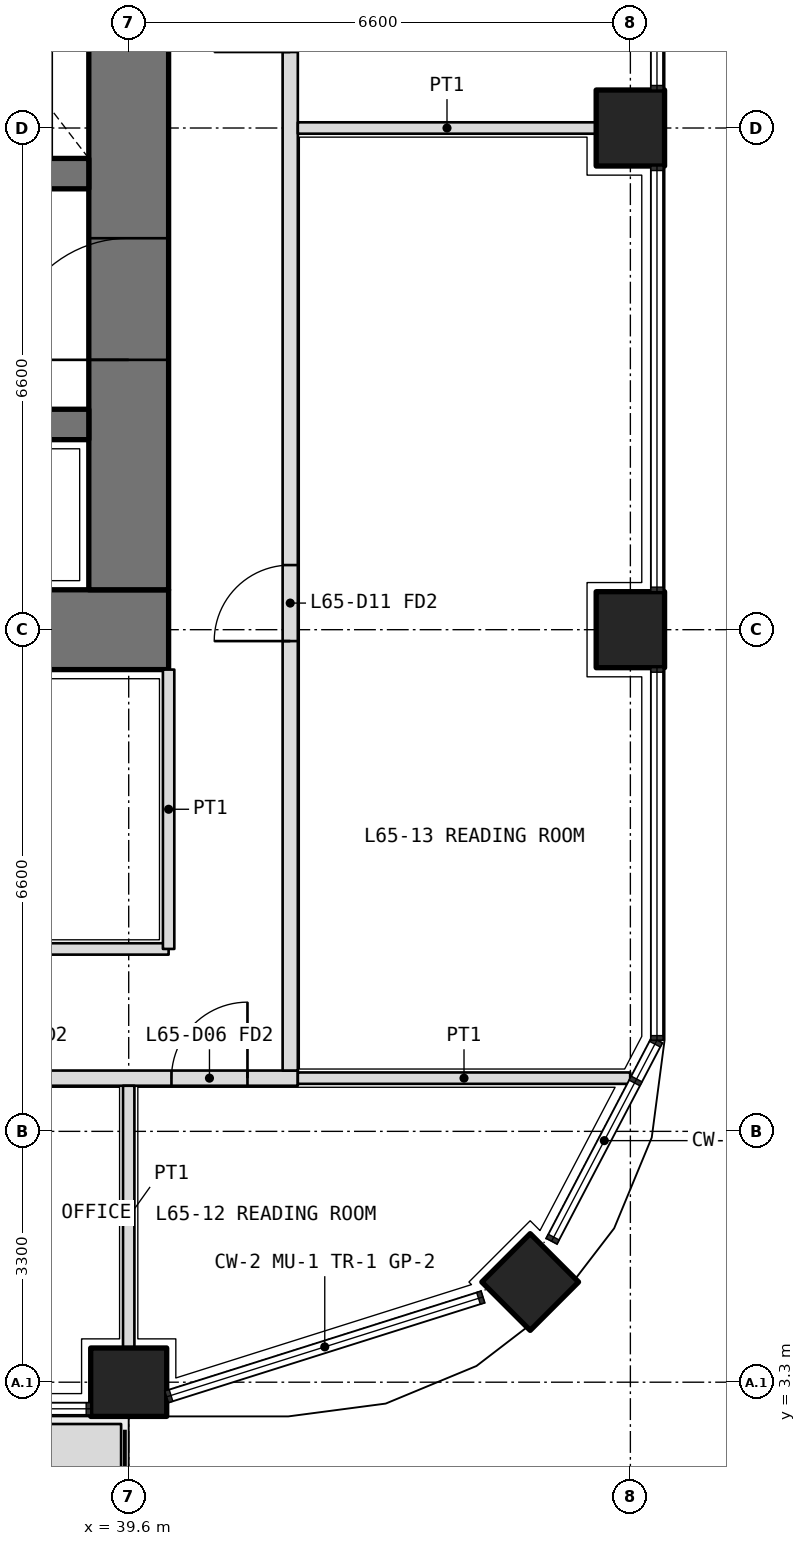
"""IFC4 building model, lengths in metres.
Left out: names, types, materials, properties, quantities, classifications, styles, units other than length and angle.
Written with IfcOpenShell. Run it as: python <this file> out.ifc"""

import sys

from ifc_helpers import new_model, si_unit, direction, frame, frame_2d, origin, origin_2d, place, context, subcontext, project, spatial, polyline, rectangle, outline, extrude, element, fill, save


model = new_model("IFC4")
c1 = context("Model", 3, precision=1e-05, world=origin(), true_north=direction((0.0, 1.0)))
c2 = subcontext(c1, "Body", "Model", "MODEL_VIEW")
j1 = project(units=[si_unit("LENGTHUNIT", "METRE"), si_unit("PLANEANGLEUNIT", "RADIAN")], contexts=[c1])
p1 = place(None, origin())
s1 = spatial("IfcSite", under=j1, at=p1, CompositionType="ELEMENT")
p2 = place(p1, origin())
s2 = spatial("IfcBuilding", under=s1, at=p2, CompositionType="ELEMENT")
p3 = place(p2, frame((0.0, 0.0, 283.8)))
s3 = spatial("IfcBuildingStorey", under=s2, at=p3, CompositionType="ELEMENT", Elevation=283.8)
p4 = place(p3, frame((44.882, 4.618, 0.0), z_axis=(0.0, 0.0, 1.0), x_axis=(0.707106781187, 0.707106781187, 0.0)))
e1 = element("IfcColumn", 1, at=p4, inside=s3, PredefinedType="COLUMN", context=c2, shape_type="SweptSolid", body=[
    extrude(rectangle(XDim=0.9, YDim=0.9, at=origin_2d()), origin(), (0.0, 0.0, 1.0), 4.2),
])
for number, where, z_axis, x_axis in (
    (2, (39.6, 3.3, 0.0), (0.0, 0.0, 1.0), (1.0, 0.0, 0.0)),
    (3, (46.2, 13.2, 0.0), (0.0, 0.0, 1.0), (0.0, 1.0, 0.0)),
    (4, (46.2, 19.8, 0.0), (0.0, 0.0, 1.0), (0.0, 1.0, 0.0)),
):
    element("IfcColumn", number, at=place(p3, frame(where, z_axis=z_axis, x_axis=x_axis)), inside=s3, PredefinedType="COLUMN", context=c2, shape_type="SweptSolid", body=[
        extrude(rectangle(XDim=1.0, YDim=0.9, at=origin_2d()), origin(), (0.0, 0.0, 1.0), 4.2),
    ])
p5 = place(p3, origin())
e5 = element("IfcWall", 5, at=p5, inside=s3, PredefinedType="USERDEFINED", context=c2, shape_type="SweptSolid", body=[
    extrude(outline(polyline([(30.45, 1.75), (39.5, 1.75), (39.5, 2.75), (30.45, 2.75), (30.45, 1.75)]), holes=[polyline([(30.6, 1.9), (39.35, 1.9), (39.35, 2.6), (30.6, 2.6), (30.6, 1.9)])]), origin(), (0.0, 0.0, 1.0), 1.05),
])
p6 = place(p3, frame((12.675, 13.2, 0.0), z_axis=(0.0, 0.0, 1.0), x_axis=(1.0, 0.0, 0.0)))
e6 = element("IfcWall", 6, at=p6, inside=s3, PredefinedType="SHEAR", context=c2, shape_type="SweptSolid", body=[
    extrude(rectangle(XDim=27.45, YDim=1.05, at=frame_2d((13.725, 0.0))), origin(), (0.0, 0.0, 1.0), 4.2),
])
p7 = place(p3, frame((39.6, 13.725, 0.0), z_axis=(0.0, 0.0, 1.0), x_axis=(0.0, 1.0, 0.0)))
e7 = element("IfcWall", 7, at=p7, inside=s3, PredefinedType="SHEAR", context=c2, shape_type="SweptSolid", body=[
    extrude(rectangle(XDim=18.75, YDim=1.05, at=frame_2d((9.375, 0.0))), origin(), (0.0, 0.0, 1.0), 4.2),
])
p8 = place(p7, frame((3.025, 0.0, 0.0)))
e8 = element("IfcOpeningElement", 8, at=p8, cuts=e7, PredefinedType="OPENING", context=c2, shape_type="SweptSolid", body=[
    extrude(rectangle(XDim=1.6, YDim=2.1, at=frame_2d((0.8, 1.05))), frame((0.0, 0.535, 0.0), z_axis=(0.0, -1.0, 0.0), x_axis=(1.0, 0.0, 0.0)), (0.0, 0.0, 1.0), 1.07),
])
p9 = place(p7, frame((13.825, 0.0, 0.0)))
e9 = element("IfcOpeningElement", 9, at=p9, cuts=e7, PredefinedType="OPENING", context=c2, shape_type="SweptSolid", body=[
    extrude(rectangle(XDim=1.6, YDim=2.1, at=frame_2d((0.8, 1.05))), frame((0.0, 0.535, 0.0), z_axis=(0.0, -1.0, 0.0), x_axis=(1.0, 0.0, 0.0)), (0.0, 0.0, 1.0), 1.07),
])
p10 = place(p3, frame((13.725, 15.9, 0.0), z_axis=(0.0, 0.0, 1.0), x_axis=(1.0, 0.0, 0.0)))
e10 = element("IfcWall", 10, at=p10, inside=s3, PredefinedType="SHEAR", context=c2, shape_type="SweptSolid", body=[
    extrude(rectangle(XDim=25.35, YDim=0.4, at=frame_2d((12.675, 0.0))), origin(), (0.0, 0.0, 1.0), 4.2),
])
p11 = place(p10, frame((0.837, 0.0, 0.0)))
e11 = element("IfcOpeningElement", 11, at=p11, cuts=e10, PredefinedType="OPENING", context=c2, shape_type="SweptSolid", body=[
    extrude(rectangle(XDim=1.0, YDim=2.1, at=frame_2d((0.5, 1.05))), frame((0.0, 0.21, 0.0), z_axis=(0.0, -1.0, 0.0), x_axis=(1.0, 0.0, 0.0)), (0.0, 0.0, 1.0), 0.42),
])
p12 = place(p10, frame((3.925, 0.0, 0.0)))
e12 = element("IfcOpeningElement", 12, at=p12, cuts=e10, PredefinedType="OPENING", context=c2, shape_type="SweptSolid", body=[
    extrude(rectangle(XDim=1.0, YDim=2.1, at=frame_2d((0.5, 1.05))), frame((0.0, 0.21, 0.0), z_axis=(0.0, -1.0, 0.0), x_axis=(1.0, 0.0, 0.0)), (0.0, 0.0, 1.0), 0.42),
])
p13 = place(p10, frame((7.225, 0.0, 0.0)))
e13 = element("IfcOpeningElement", 13, at=p13, cuts=e10, PredefinedType="OPENING", context=c2, shape_type="SweptSolid", body=[
    extrude(rectangle(XDim=1.0, YDim=2.1, at=frame_2d((0.5, 1.05))), frame((0.0, 0.21, 0.0), z_axis=(0.0, -1.0, 0.0), x_axis=(1.0, 0.0, 0.0)), (0.0, 0.0, 1.0), 0.42),
])
p14 = place(p10, frame((10.525, 0.0, 0.0)))
e14 = element("IfcOpeningElement", 14, at=p14, cuts=e10, PredefinedType="OPENING", context=c2, shape_type="SweptSolid", body=[
    extrude(rectangle(XDim=1.0, YDim=2.1, at=frame_2d((0.5, 1.05))), frame((0.0, 0.21, 0.0), z_axis=(0.0, -1.0, 0.0), x_axis=(1.0, 0.0, 0.0)), (0.0, 0.0, 1.0), 0.42),
])
p15 = place(p10, frame((13.825, 0.0, 0.0)))
e15 = element("IfcOpeningElement", 15, at=p15, cuts=e10, PredefinedType="OPENING", context=c2, shape_type="SweptSolid", body=[
    extrude(rectangle(XDim=1.0, YDim=2.1, at=frame_2d((0.5, 1.05))), frame((0.0, 0.21, 0.0), z_axis=(0.0, -1.0, 0.0), x_axis=(1.0, 0.0, 0.0)), (0.0, 0.0, 1.0), 0.42),
])
p16 = place(p10, frame((17.125, 0.0, 0.0)))
e16 = element("IfcOpeningElement", 16, at=p16, cuts=e10, PredefinedType="OPENING", context=c2, shape_type="SweptSolid", body=[
    extrude(rectangle(XDim=1.0, YDim=2.1, at=frame_2d((0.5, 1.05))), frame((0.0, 0.21, 0.0), z_axis=(0.0, -1.0, 0.0), x_axis=(1.0, 0.0, 0.0)), (0.0, 0.0, 1.0), 0.42),
])
p17 = place(p10, frame((20.425, 0.0, 0.0)))
e17 = element("IfcOpeningElement", 17, at=p17, cuts=e10, PredefinedType="OPENING", context=c2, shape_type="SweptSolid", body=[
    extrude(rectangle(XDim=1.0, YDim=2.1, at=frame_2d((0.5, 1.05))), frame((0.0, 0.21, 0.0), z_axis=(0.0, -1.0, 0.0), x_axis=(1.0, 0.0, 0.0)), (0.0, 0.0, 1.0), 0.42),
])
p18 = place(p10, frame((23.512, 0.0, 0.0)))
e18 = element("IfcOpeningElement", 18, at=p18, cuts=e10, PredefinedType="OPENING", context=c2, shape_type="SweptSolid", body=[
    extrude(rectangle(XDim=1.0, YDim=2.1, at=frame_2d((0.5, 1.05))), frame((0.0, 0.21, 0.0), z_axis=(0.0, -1.0, 0.0), x_axis=(1.0, 0.0, 0.0)), (0.0, 0.0, 1.0), 0.42),
])
p19 = place(p3, frame((13.725, 19.2, 0.0), z_axis=(0.0, 0.0, 1.0), x_axis=(1.0, 0.0, 0.0)))
e19 = element("IfcWall", 19, at=p19, inside=s3, PredefinedType="SHEAR", context=c2, shape_type="SweptSolid", body=[
    extrude(rectangle(XDim=25.35, YDim=0.4, at=frame_2d((12.675, 0.0))), origin(), (0.0, 0.0, 1.0), 4.2),
])
p20 = place(p19, frame((10.575, 0.0, 0.0)))
e20 = element("IfcOpeningElement", 20, at=p20, cuts=e19, PredefinedType="OPENING", context=c2, shape_type="SweptSolid", body=[
    extrude(rectangle(XDim=0.9, YDim=2.1, at=frame_2d((0.45, 1.05))), frame((0.0, 0.21, 0.0), z_axis=(0.0, -1.0, 0.0), x_axis=(1.0, 0.0, 0.0)), (0.0, 0.0, 1.0), 0.42),
])
p21 = place(p19, frame((13.875, 0.0, 0.0)))
e21 = element("IfcOpeningElement", 21, at=p21, cuts=e19, PredefinedType="OPENING", context=c2, shape_type="SweptSolid", body=[
    extrude(rectangle(XDim=0.9, YDim=2.1, at=frame_2d((0.45, 1.05))), frame((0.0, 0.21, 0.0), z_axis=(0.0, -1.0, 0.0), x_axis=(1.0, 0.0, 0.0)), (0.0, 0.0, 1.0), 0.42),
])
p22 = place(p19, frame((0.2, 0.0, 0.0)))
e22 = element("IfcOpeningElement", 22, at=p22, cuts=e19, PredefinedType="OPENING", context=c2, shape_type="SweptSolid", body=[
    extrude(rectangle(XDim=1.2, YDim=2.1, at=frame_2d((0.6, 1.05))), frame((0.0, 0.21, 0.0), z_axis=(0.0, -1.0, 0.0), x_axis=(1.0, 0.0, 0.0)), (0.0, 0.0, 1.0), 0.42),
])
p23 = place(p19, frame((23.512, 0.0, 0.0)))
e23 = element("IfcOpeningElement", 23, at=p23, cuts=e19, PredefinedType="OPENING", context=c2, shape_type="SweptSolid", body=[
    extrude(rectangle(XDim=1.1, YDim=2.1, at=frame_2d((0.55, 1.05))), frame((0.0, 0.21, 0.0), z_axis=(0.0, -1.0, 0.0), x_axis=(1.0, 0.0, 0.0)), (0.0, 0.0, 1.0), 0.42),
])
p24 = place(p19, frame((17.125, 0.0, 0.0)))
e24 = element("IfcOpeningElement", 24, at=p24, cuts=e19, PredefinedType="OPENING", context=c2, shape_type="SweptSolid", body=[
    extrude(rectangle(XDim=1.1, YDim=2.1, at=frame_2d((0.55, 1.05))), frame((0.0, 0.21, 0.0), z_axis=(0.0, -1.0, 0.0), x_axis=(1.0, 0.0, 0.0)), (0.0, 0.0, 1.0), 0.42),
])
p25 = place(p19, frame((20.325, 0.0, 0.0)))
e25 = element("IfcOpeningElement", 25, at=p25, cuts=e19, PredefinedType="OPENING", context=c2, shape_type="SweptSolid", body=[
    extrude(rectangle(XDim=1.1, YDim=2.1, at=frame_2d((0.55, 1.05))), frame((0.0, 0.21, 0.0), z_axis=(0.0, -1.0, 0.0), x_axis=(1.0, 0.0, 0.0)), (0.0, 0.0, 1.0), 0.42),
])
p26 = place(p3, frame((12.675, 9.0, 0.0), z_axis=(0.0, 0.0, 1.0), x_axis=(1.0, 0.0, 0.0)))
e26 = element("IfcWall", 26, at=p26, inside=s3, PredefinedType="PARTITIONING", context=c2, shape_type="SweptSolid", body=[
    extrude(rectangle(XDim=27.45, YDim=0.15, at=frame_2d((13.725, 0.0))), origin(), (0.0, 0.0, 1.0), 3.0),
])
p27 = place(p26, frame((3.062, 0.0, 0.0)))
e27 = element("IfcOpeningElement", 27, at=p27, cuts=e26, PredefinedType="OPENING", context=c2, shape_type="SweptSolid", body=[
    extrude(rectangle(XDim=1.0, YDim=2.1, at=frame_2d((0.5, 1.05))), frame((0.0, 0.085, 0.0), z_axis=(0.0, -1.0, 0.0), x_axis=(1.0, 0.0, 0.0)), (0.0, 0.0, 1.0), 0.17),
])
p28 = place(p26, frame((13.225, 0.0, 0.0)))
e28 = element("IfcOpeningElement", 28, at=p28, cuts=e26, PredefinedType="OPENING", context=c2, shape_type="SweptSolid", body=[
    extrude(rectangle(XDim=1.0, YDim=2.1, at=frame_2d((0.5, 1.05))), frame((0.0, 0.085, 0.0), z_axis=(0.0, -1.0, 0.0), x_axis=(1.0, 0.0, 0.0)), (0.0, 0.0, 1.0), 0.17),
])
p29 = place(p26, frame((23.387, 0.0, 0.0)))
e29 = element("IfcOpeningElement", 29, at=p29, cuts=e26, PredefinedType="OPENING", context=c2, shape_type="SweptSolid", body=[
    extrude(rectangle(XDim=1.0, YDim=2.1, at=frame_2d((0.5, 1.05))), frame((0.0, 0.085, 0.0), z_axis=(0.0, -1.0, 0.0), x_axis=(1.0, 0.0, 0.0)), (0.0, 0.0, 1.0), 0.17),
])
p30 = place(p3, frame((40.125, 12.675, 0.0), z_axis=(0.0, 0.0, 1.0), x_axis=(0.0, -1.0, 0.0)))
e30 = element("IfcWall", 30, at=p30, inside=s3, PredefinedType="PARTITIONING", context=c2, shape_type="SweptSolid", body=[
    extrude(rectangle(XDim=3.675, YDim=0.15, at=frame_2d((1.837, 0.0))), origin(), (0.0, 0.0, 1.0), 3.0),
])
p31 = place(p3, frame((10.975, 7.3, 0.0), z_axis=(0.0, 0.0, 1.0), x_axis=(1.0, 0.0, 0.0)))
e31 = element("IfcWall", 31, at=p31, inside=s3, PredefinedType="PARTITIONING", context=c2, shape_type="SweptSolid", body=[
    extrude(rectangle(XDim=30.85, YDim=0.2, at=frame_2d((15.425, 0.0))), origin(), (0.0, 0.0, 1.0), 3.0),
])
p32 = place(p31, frame((2.312, 0.0, 0.0)))
e32 = element("IfcOpeningElement", 32, at=p32, cuts=e31, PredefinedType="OPENING", context=c2, shape_type="SweptSolid", body=[
    extrude(rectangle(XDim=1.0, YDim=2.1, at=frame_2d((0.5, 1.05))), frame((0.0, 0.11, 0.0), z_axis=(0.0, -1.0, 0.0), x_axis=(1.0, 0.0, 0.0)), (0.0, 0.0, 1.0), 0.22),
])
p33 = place(p31, frame((9.975, 0.0, 0.0)))
e33 = element("IfcOpeningElement", 33, at=p33, cuts=e31, PredefinedType="OPENING", context=c2, shape_type="SweptSolid", body=[
    extrude(rectangle(XDim=1.0, YDim=2.1, at=frame_2d((0.5, 1.05))), frame((0.0, 0.11, 0.0), z_axis=(0.0, -1.0, 0.0), x_axis=(1.0, 0.0, 0.0)), (0.0, 0.0, 1.0), 0.22),
])
p34 = place(p31, frame((19.875, 0.0, 0.0)))
e34 = element("IfcOpeningElement", 34, at=p34, cuts=e31, PredefinedType="OPENING", context=c2, shape_type="SweptSolid", body=[
    extrude(rectangle(XDim=1.0, YDim=2.1, at=frame_2d((0.5, 1.05))), frame((0.0, 0.11, 0.0), z_axis=(0.0, -1.0, 0.0), x_axis=(1.0, 0.0, 0.0)), (0.0, 0.0, 1.0), 0.22),
])
p35 = place(p31, frame((26.475, 0.0, 0.0)))
e35 = element("IfcOpeningElement", 35, at=p35, cuts=e31, PredefinedType="OPENING", context=c2, shape_type="SweptSolid", body=[
    extrude(rectangle(XDim=1.0, YDim=2.1, at=frame_2d((0.5, 1.05))), frame((0.0, 0.11, 0.0), z_axis=(0.0, -1.0, 0.0), x_axis=(1.0, 0.0, 0.0)), (0.0, 0.0, 1.0), 0.22),
])
p36 = place(p31, frame((29.188, 0.0, 0.0)))
e36 = element("IfcOpeningElement", 36, at=p36, cuts=e31, PredefinedType="OPENING", context=c2, shape_type="SweptSolid", body=[
    extrude(rectangle(XDim=1.0, YDim=2.1, at=frame_2d((0.5, 1.05))), frame((0.0, 0.11, 0.0), z_axis=(0.0, -1.0, 0.0), x_axis=(1.0, 0.0, 0.0)), (0.0, 0.0, 1.0), 0.22),
])
p37 = place(p3, frame((41.725, 7.4, 0.0), z_axis=(0.0, 0.0, 1.0), x_axis=(0.0, 1.0, 0.0)))
e37 = element("IfcWall", 37, at=p37, inside=s3, PredefinedType="PARTITIONING", context=c2, shape_type="SweptSolid", body=[
    extrude(rectangle(XDim=31.4, YDim=0.2, at=frame_2d((15.7, 0.0))), origin(), (0.0, 0.0, 1.0), 3.0),
])
p38 = place(p37, frame((5.65, 0.0, 0.0)))
e38 = element("IfcOpeningElement", 38, at=p38, cuts=e37, PredefinedType="OPENING", context=c2, shape_type="SweptSolid", body=[
    extrude(rectangle(XDim=1.0, YDim=2.1, at=frame_2d((0.5, 1.05))), frame((0.0, 0.11, 0.0), z_axis=(0.0, -1.0, 0.0), x_axis=(1.0, 0.0, 0.0)), (0.0, 0.0, 1.0), 0.22),
])
p39 = place(p37, frame((13.4, 0.0, 0.0)))
e39 = element("IfcOpeningElement", 39, at=p39, cuts=e37, PredefinedType="OPENING", context=c2, shape_type="SweptSolid", body=[
    extrude(rectangle(XDim=1.0, YDim=2.1, at=frame_2d((0.5, 1.05))), frame((0.0, 0.11, 0.0), z_axis=(0.0, -1.0, 0.0), x_axis=(1.0, 0.0, 0.0)), (0.0, 0.0, 1.0), 0.22),
])
p40 = place(p37, frame((16.75, 0.0, 0.0)))
e40 = element("IfcOpeningElement", 40, at=p40, cuts=e37, PredefinedType="OPENING", context=c2, shape_type="SweptSolid", body=[
    extrude(rectangle(XDim=0.9, YDim=2.1, at=frame_2d((0.45, 1.05))), frame((0.0, 0.11, 0.0), z_axis=(0.0, -1.0, 0.0), x_axis=(1.0, 0.0, 0.0)), (0.0, 0.0, 1.0), 0.22),
])
p41 = place(p37, frame((24.75, 0.0, 0.0)))
e41 = element("IfcOpeningElement", 41, at=p41, cuts=e37, PredefinedType="OPENING", context=c2, shape_type="SweptSolid", body=[
    extrude(rectangle(XDim=1.0, YDim=2.1, at=frame_2d((0.5, 1.05))), frame((0.0, 0.11, 0.0), z_axis=(0.0, -1.0, 0.0), x_axis=(1.0, 0.0, 0.0)), (0.0, 0.0, 1.0), 0.22),
])
p42 = place(p3, frame((46.198, 7.3, 0.0), z_axis=(0.0, 0.0, 1.0), x_axis=(-1.0, 0.0, 0.0)))
e42 = element("IfcWall", 42, at=p42, inside=s3, PredefinedType="PARTITIONING", context=c2, shape_type="SweptSolid", body=[
    extrude(rectangle(XDim=4.373, YDim=0.15, at=frame_2d((2.186, 0.0))), origin(), (0.0, 0.0, 1.0), 2.7),
])
p43 = place(p3, frame((39.6, 3.75, 0.0), z_axis=(0.0, 0.0, 1.0), x_axis=(0.0, 1.0, 0.0)))
e43 = element("IfcWall", 43, at=p43, inside=s3, PredefinedType="PARTITIONING", context=c2, shape_type="SweptSolid", body=[
    extrude(rectangle(XDim=3.45, YDim=0.15, at=frame_2d((1.725, 0.0))), origin(), (0.0, 0.0, 1.0), 3.0),
])
p44 = place(p3, frame((45.75, 19.8, 0.0), z_axis=(0.0, 0.0, 1.0), x_axis=(-1.0, 0.0, 0.0)))
e44 = element("IfcWall", 44, at=p44, inside=s3, PredefinedType="PARTITIONING", context=c2, shape_type="SweptSolid", body=[
    extrude(rectangle(XDim=3.925, YDim=0.15, at=frame_2d((1.962, 0.0))), origin(), (0.0, 0.0, 1.0), 3.0),
])
p45 = place(p36, origin())
e45 = element("IfcDoor", 45, at=p45, inside=s3, OperationType="SINGLE_SWING_RIGHT", PredefinedType="DOOR", context=c2, shape_type="SweptSolid", body=[
    extrude(rectangle(XDim=1.0, YDim=2.1, at=frame_2d((0.5, 1.05))), frame((0.0, 0.025, 0.0), z_axis=(0.0, -1.0, 0.0), x_axis=(1.0, 0.0, 0.0)), (0.0, 0.0, 1.0), 0.05),
])
fill(e36, e45)
p46 = place(p38, origin())
e46 = element("IfcDoor", 46, at=p46, inside=s3, OperationType="SINGLE_SWING_LEFT", PredefinedType="DOOR", context=c2, shape_type="SweptSolid", body=[
    extrude(rectangle(XDim=1.0, YDim=2.1, at=frame_2d((0.5, 1.05))), frame((0.0, 0.025, 0.0), z_axis=(0.0, -1.0, 0.0), x_axis=(1.0, 0.0, 0.0)), (0.0, 0.0, 1.0), 0.05),
])
fill(e38, e46)
p47 = place(p39, origin())
e47 = element("IfcDoor", 47, at=p47, inside=s3, OperationType="SINGLE_SWING_LEFT", PredefinedType="DOOR", context=c2, shape_type="SweptSolid", body=[
    extrude(rectangle(XDim=1.0, YDim=2.1, at=frame_2d((0.5, 1.05))), frame((0.0, 0.025, 0.0), z_axis=(0.0, -1.0, 0.0), x_axis=(1.0, 0.0, 0.0)), (0.0, 0.0, 1.0), 0.05),
])
fill(e39, e47)
p48 = place(p8, origin())
e48 = element("IfcDoor", 48, at=p48, inside=s3, OperationType="DOUBLE_DOOR_DOUBLE_SWING", PredefinedType="DOOR", context=c2, shape_type="SweptSolid", body=[
    extrude(rectangle(XDim=1.6, YDim=2.1, at=frame_2d((0.8, 1.05))), frame((0.0, 0.025, 0.0), z_axis=(0.0, -1.0, 0.0), x_axis=(1.0, 0.0, 0.0)), (0.0, 0.0, 1.0), 0.05),
])
fill(e8, e48)
save(model, sys.argv[1])
